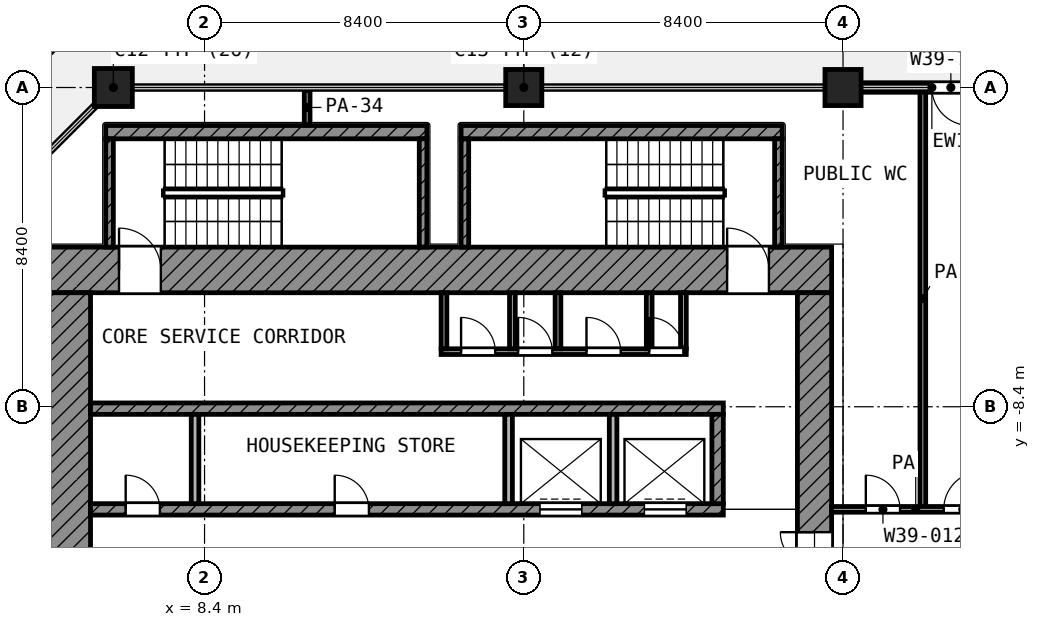
"""IFC4 building model, lengths in metres.
Left out: names, types, materials, properties, quantities, classifications, styles, units other than length and angle.
Written with IfcOpenShell. Run it as: python <this file> out.ifc"""

import sys

from ifc_helpers import new_model, si_unit, direction, frame, frame_2d, origin, origin_2d, place, context, subcontext, project, spatial, rectangle, extrude, element, fill, save


model = new_model("IFC4")
c1 = context("Model", 3, precision=1e-05, world=origin(), true_north=direction((0.0, 1.0)))
c2 = subcontext(c1, "Body", "Model", "MODEL_VIEW")
j1 = project(units=[si_unit("LENGTHUNIT", "METRE"), si_unit("PLANEANGLEUNIT", "RADIAN")], contexts=[c1])
p1 = place(None, origin())
s1 = spatial("IfcSite", under=j1, at=p1, CompositionType="ELEMENT")
p2 = place(p1, origin())
s2 = spatial("IfcBuilding", under=s1, at=p2, CompositionType="ELEMENT")
p3 = place(p2, frame((0.0, 0.0, 192.0)))
s3 = spatial("IfcBuildingStorey", under=s2, at=p3, CompositionType="ELEMENT", Elevation=192.0)
p4 = place(p3, frame((6.0, 0.0, 0.0), z_axis=(0.0, 0.0, 1.0), x_axis=(1.0, 0.0, 0.0)))
e1 = element("IfcColumn", 1, at=p4, inside=s3, PredefinedType="COLUMN", context=c2, shape_type="SweptSolid", body=[
    extrude(rectangle(XDim=1.0, YDim=1.0, at=origin_2d()), origin(), (0.0, 0.0, 1.0), 4.2),
])
for number, where, z_axis, x_axis in (
    (2, (16.8, 0.0, 0.0), (0.0, 0.0, 1.0), (1.0, 0.0, 0.0)),
    (3, (25.2, 0.0, 0.0), (0.0, 0.0, 1.0), (1.0, 0.0, 0.0)),
):
    element("IfcColumn", number, at=place(p3, frame(where, z_axis=z_axis, x_axis=x_axis)), inside=s3, PredefinedType="COLUMN", context=c2, shape_type="SweptSolid", body=[
        extrude(rectangle(XDim=0.95, YDim=0.95, at=origin_2d()), origin(), (0.0, 0.0, 1.0), 4.2),
    ])
p5 = place(p3, frame((29.4, 0.0, 0.0), z_axis=(0.0, 0.0, 1.0), x_axis=(-1.0, 0.0, 0.0)))
e4 = element("IfcWall", 4, at=p5, inside=s3, PredefinedType="SOLIDWALL", context=c2, shape_type="SweptSolid", body=[
    extrude(rectangle(XDim=3.725, YDim=0.25, at=frame_2d((1.862, 0.0))), origin(), (0.0, 0.0, 1.0), 2.58),
])
p6 = place(p5, frame((0.863, 0.0, 0.0)))
e5 = element("IfcOpeningElement", 5, at=p6, cuts=e4, PredefinedType="OPENING", context=c2, shape_type="SweptSolid", body=[
    extrude(rectangle(XDim=1.0, YDim=2.1, at=frame_2d((0.5, 1.05))), frame((0.0, 0.135, 0.0), z_axis=(0.0, -1.0, 0.0), x_axis=(1.0, 0.0, 0.0)), (0.0, 0.0, 1.0), 0.27),
])
p7 = place(p3, frame((4.2, -4.8, 0.0), z_axis=(0.0, 0.0, 1.0), x_axis=(1.0, 0.0, 0.0)))
e6 = element("IfcWall", 6, at=p7, inside=s3, PredefinedType="SHEAR", context=c2, shape_type="SweptSolid", body=[
    extrude(rectangle(XDim=20.7, YDim=1.2, at=frame_2d((10.35, 0.0))), origin(), (0.0, 0.0, 1.0), 3.6),
])
p8 = place(p7, frame((1.95, 0.0, 0.0)))
e7 = element("IfcOpeningElement", 7, at=p8, cuts=e6, PredefinedType="OPENING", context=c2, shape_type="SweptSolid", body=[
    extrude(rectangle(XDim=1.1, YDim=2.1, at=frame_2d((0.55, 1.05))), frame((0.0, 0.61, 0.0), z_axis=(0.0, -1.0, 0.0), x_axis=(1.0, 0.0, 0.0)), (0.0, 0.0, 1.0), 1.22),
])
p9 = place(p7, frame((17.95, 0.0, 0.0)))
e8 = element("IfcOpeningElement", 8, at=p9, cuts=e6, PredefinedType="OPENING", context=c2, shape_type="SweptSolid", body=[
    extrude(rectangle(XDim=1.1, YDim=2.1, at=frame_2d((0.55, 1.05))), frame((0.0, 0.61, 0.0), z_axis=(0.0, -1.0, 0.0), x_axis=(1.0, 0.0, 0.0)), (0.0, 0.0, 1.0), 1.22),
])
p10 = place(p3, frame((4.8, -24.9, 0.0), z_axis=(0.0, 0.0, 1.0), x_axis=(0.0, 1.0, 0.0)))
e9 = element("IfcWall", 9, at=p10, inside=s3, PredefinedType="SHEAR", context=c2, shape_type="SweptSolid", body=[
    extrude(rectangle(XDim=19.5, YDim=1.2, at=frame_2d((9.75, 0.0))), origin(), (0.0, 0.0, 1.0), 3.6),
])
p11 = place(p10, frame((11.35, 0.0, 0.0)))
e10 = element("IfcOpeningElement", 10, at=p11, cuts=e9, PredefinedType="OPENING", context=c2, shape_type="SweptSolid", body=[
    extrude(rectangle(XDim=1.1, YDim=2.1, at=frame_2d((0.55, 1.05))), frame((0.0, 0.61, 0.0), z_axis=(0.0, -1.0, 0.0), x_axis=(1.0, 0.0, 0.0)), (0.0, 0.0, 1.0), 1.22),
])
p12 = place(p10, frame((2.05, 0.0, 0.0)))
e11 = element("IfcOpeningElement", 11, at=p12, cuts=e9, PredefinedType="OPENING", context=c2, shape_type="SweptSolid", body=[
    extrude(rectangle(XDim=1.1, YDim=2.1, at=frame_2d((0.55, 1.05))), frame((0.0, 0.61, 0.0), z_axis=(0.0, -1.0, 0.0), x_axis=(1.0, 0.0, 0.0)), (0.0, 0.0, 1.0), 1.22),
])
p13 = place(p3, frame((24.45, -24.0, 0.0), z_axis=(0.0, 0.0, 1.0), x_axis=(0.0, 1.0, 0.0)))
e12 = element("IfcWall", 12, at=p13, inside=s3, PredefinedType="SHEAR", context=c2, shape_type="SweptSolid", body=[
    extrude(rectangle(XDim=18.6, YDim=0.9, at=frame_2d((9.3, 0.0))), origin(), (0.0, 0.0, 1.0), 3.6),
])
p14 = place(p13, frame((10.5, 0.0, 0.0)))
e13 = element("IfcOpeningElement", 13, at=p14, cuts=e12, PredefinedType="OPENING", context=c2, shape_type="SweptSolid", body=[
    extrude(rectangle(XDim=1.8, YDim=2.1, at=frame_2d((0.9, 1.05))), frame((0.0, 0.46, 0.0), z_axis=(0.0, -1.0, 0.0), x_axis=(1.0, 0.0, 0.0)), (0.0, 0.0, 1.0), 0.92),
])
p15 = place(p3, frame((5.4, -8.45, 0.0), z_axis=(0.0, 0.0, 1.0), x_axis=(1.0, 0.0, 0.0)))
e14 = element("IfcWall", 14, at=p15, inside=s3, PredefinedType="SHEAR", context=c2, shape_type="SweptSolid", body=[
    extrude(rectangle(XDim=16.65, YDim=0.3, at=frame_2d((8.325, 0.0))), origin(), (0.0, 0.0, 1.0), 3.6),
])
p16 = place(p3, frame((5.4, -11.1, 0.0), z_axis=(0.0, 0.0, 1.0), x_axis=(1.0, 0.0, 0.0)))
e15 = element("IfcWall", 15, at=p16, inside=s3, PredefinedType="SHEAR", context=c2, shape_type="SweptSolid", body=[
    extrude(rectangle(XDim=16.65, YDim=0.3, at=frame_2d((8.325, 0.0))), origin(), (0.0, 0.0, 1.0), 3.6),
])
p17 = place(p16, frame((11.825, 0.0, 0.0)))
e16 = element("IfcOpeningElement", 16, at=p17, cuts=e15, PredefinedType="OPENING", context=c2, shape_type="SweptSolid", body=[
    extrude(rectangle(XDim=1.1, YDim=2.1, at=frame_2d((0.55, 1.05))), frame((0.0, 0.16, 0.0), z_axis=(0.0, -1.0, 0.0), x_axis=(1.0, 0.0, 0.0)), (0.0, 0.0, 1.0), 0.32),
])
p18 = place(p16, frame((14.575, 0.0, 0.0)))
e17 = element("IfcOpeningElement", 17, at=p18, cuts=e15, PredefinedType="OPENING", context=c2, shape_type="SweptSolid", body=[
    extrude(rectangle(XDim=1.1, YDim=2.1, at=frame_2d((0.55, 1.05))), frame((0.0, 0.16, 0.0), z_axis=(0.0, -1.0, 0.0), x_axis=(1.0, 0.0, 0.0)), (0.0, 0.0, 1.0), 0.32),
])
p19 = place(p16, frame((0.925, 0.0, 0.0)))
e18 = element("IfcOpeningElement", 18, at=p19, cuts=e15, PredefinedType="OPENING", context=c2, shape_type="SweptSolid", body=[
    extrude(rectangle(XDim=0.9, YDim=2.1, at=frame_2d((0.45, 1.05))), frame((0.0, 0.16, 0.0), z_axis=(0.0, -1.0, 0.0), x_axis=(1.0, 0.0, 0.0)), (0.0, 0.0, 1.0), 0.32),
])
p20 = place(p16, frame((6.425, 0.0, 0.0)))
e19 = element("IfcOpeningElement", 19, at=p20, cuts=e15, PredefinedType="OPENING", context=c2, shape_type="SweptSolid", body=[
    extrude(rectangle(XDim=0.9, YDim=2.1, at=frame_2d((0.45, 1.05))), frame((0.0, 0.16, 0.0), z_axis=(0.0, -1.0, 0.0), x_axis=(1.0, 0.0, 0.0)), (0.0, 0.0, 1.0), 0.32),
])
p21 = place(p3, frame((21.9, -10.95, 0.0), z_axis=(0.0, 0.0, 1.0), x_axis=(0.0, 1.0, 0.0)))
e20 = element("IfcWall", 20, at=p21, inside=s3, PredefinedType="SHEAR", context=c2, shape_type="SweptSolid", body=[
    extrude(rectangle(XDim=2.35, YDim=0.3, at=frame_2d((1.175, 0.0))), origin(), (0.0, 0.0, 1.0), 3.6),
])
for number, where, z_axis, x_axis in (
    (21, (8.15, -10.95, 0.0), (0.0, 0.0, 1.0), (0.0, 1.0, 0.0)),
    (22, (16.4, -10.95, 0.0), (0.0, 0.0, 1.0), (0.0, 1.0, 0.0)),
    (23, (19.15, -10.95, 0.0), (0.0, 0.0, 1.0), (0.0, 1.0, 0.0)),
):
    element("IfcWall", number, at=place(p3, frame(where, z_axis=z_axis, x_axis=x_axis)), inside=s3, PredefinedType="PARTITIONING", context=c2, shape_type="SweptSolid", body=[
        extrude(rectangle(XDim=2.35, YDim=0.2, at=frame_2d((1.175, 0.0))), origin(), (0.0, 0.0, 1.0), 3.6),
    ])
p22 = place(p3, frame((14.625, -6.95, 0.0), z_axis=(0.0, 0.0, 1.0), x_axis=(1.0, 0.0, 0.0)))
e24 = element("IfcWall", 24, at=p22, inside=s3, PredefinedType="PARTITIONING", context=c2, shape_type="SweptSolid", body=[
    extrude(rectangle(XDim=6.45, YDim=0.15, at=frame_2d((3.225, 0.0))), origin(), (0.0, 0.0, 1.0), 3.6),
])
p23 = place(p22, frame((0.525, 0.0, 0.0)))
e25 = element("IfcOpeningElement", 25, at=p23, cuts=e24, PredefinedType="OPENING", context=c2, shape_type="SweptSolid", body=[
    extrude(rectangle(XDim=0.9, YDim=2.1, at=frame_2d((0.45, 1.05))), frame((0.0, 0.085, 0.0), z_axis=(0.0, -1.0, 0.0), x_axis=(1.0, 0.0, 0.0)), (0.0, 0.0, 1.0), 0.17),
])
p24 = place(p22, frame((2.025, 0.0, 0.0)))
e26 = element("IfcOpeningElement", 26, at=p24, cuts=e24, PredefinedType="OPENING", context=c2, shape_type="SweptSolid", body=[
    extrude(rectangle(XDim=0.9, YDim=2.1, at=frame_2d((0.45, 1.05))), frame((0.0, 0.085, 0.0), z_axis=(0.0, -1.0, 0.0), x_axis=(1.0, 0.0, 0.0)), (0.0, 0.0, 1.0), 0.17),
])
p25 = place(p22, frame((3.825, 0.0, 0.0)))
e27 = element("IfcOpeningElement", 27, at=p25, cuts=e24, PredefinedType="OPENING", context=c2, shape_type="SweptSolid", body=[
    extrude(rectangle(XDim=0.9, YDim=2.1, at=frame_2d((0.45, 1.05))), frame((0.0, 0.085, 0.0), z_axis=(0.0, -1.0, 0.0), x_axis=(1.0, 0.0, 0.0)), (0.0, 0.0, 1.0), 0.17),
])
p26 = place(p22, frame((5.475, 0.0, 0.0)))
e28 = element("IfcOpeningElement", 28, at=p26, cuts=e24, PredefinedType="OPENING", context=c2, shape_type="SweptSolid", body=[
    extrude(rectangle(XDim=0.9, YDim=2.1, at=frame_2d((0.45, 1.05))), frame((0.0, 0.085, 0.0), z_axis=(0.0, -1.0, 0.0), x_axis=(1.0, 0.0, 0.0)), (0.0, 0.0, 1.0), 0.17),
])
for number, where, z_axis, x_axis in (
    (29, (14.7, -6.875, 0.0), (0.0, 0.0, 1.0), (0.0, 1.0, 0.0)),
    (30, (16.5, -6.875, 0.0), (0.0, 0.0, 1.0), (0.0, 1.0, 0.0)),
    (31, (17.7, -6.875, 0.0), (0.0, 0.0, 1.0), (0.0, 1.0, 0.0)),
    (32, (20.1, -6.875, 0.0), (0.0, 0.0, 1.0), (0.0, 1.0, 0.0)),
    (33, (21.0, -6.875, 0.0), (0.0, 0.0, 1.0), (0.0, 1.0, 0.0)),
):
    element("IfcWall", number, at=place(p3, frame(where, z_axis=z_axis, x_axis=x_axis)), inside=s3, PredefinedType="PARTITIONING", context=c2, shape_type="SweptSolid", body=[
        extrude(rectangle(XDim=1.475, YDim=0.15, at=frame_2d((0.738, 0.0))), origin(), (0.0, 0.0, 1.0), 3.6),
    ])
p27 = place(p3, frame((5.8, -1.175, 0.0), z_axis=(0.0, 0.0, 1.0), x_axis=(1.0, 0.0, 0.0)))
e34 = element("IfcWall", 34, at=p27, inside=s3, PredefinedType="SHEAR", context=c2, shape_type="SweptSolid", body=[
    extrude(rectangle(XDim=8.45, YDim=0.35, at=frame_2d((4.225, 0.0))), origin(), (0.0, 0.0, 1.0), 3.6),
])
for number, where, z_axis, x_axis in (
    (35, (5.9, -4.2, 0.0), (0.0, 0.0, 1.0), (0.0, 1.0, 0.0)),
    (36, (14.15, -4.2, 0.0), (0.0, 0.0, 1.0), (0.0, 1.0, 0.0)),
):
    element("IfcWall", number, at=place(p3, frame(where, z_axis=z_axis, x_axis=x_axis)), inside=s3, PredefinedType="SHEAR", context=c2, shape_type="SweptSolid", body=[
        extrude(rectangle(XDim=2.85, YDim=0.2, at=frame_2d((1.425, 0.0))), origin(), (0.0, 0.0, 1.0), 3.6),
    ])
p28 = place(p3, frame((15.15, -1.175, 0.0), z_axis=(0.0, 0.0, 1.0), x_axis=(1.0, 0.0, 0.0)))
e37 = element("IfcWall", 37, at=p28, inside=s3, PredefinedType="SHEAR", context=c2, shape_type="SweptSolid", body=[
    extrude(rectangle(XDim=8.45, YDim=0.35, at=frame_2d((4.225, 0.0))), origin(), (0.0, 0.0, 1.0), 3.6),
])
for number, where, z_axis, x_axis in (
    (38, (15.25, -4.2, 0.0), (0.0, 0.0, 1.0), (0.0, 1.0, 0.0)),
    (39, (23.5, -4.2, 0.0), (0.0, 0.0, 1.0), (0.0, 1.0, 0.0)),
):
    element("IfcWall", number, at=place(p3, frame(where, z_axis=z_axis, x_axis=x_axis)), inside=s3, PredefinedType="SHEAR", context=c2, shape_type="SweptSolid", body=[
        extrude(rectangle(XDim=2.85, YDim=0.2, at=frame_2d((1.425, 0.0))), origin(), (0.0, 0.0, 1.0), 3.6),
    ])
p29 = place(p3, frame((24.9, -11.1, 0.0), z_axis=(0.0, 0.0, 1.0), x_axis=(1.0, 0.0, 0.0)))
e40 = element("IfcWall", 40, at=p29, inside=s3, PredefinedType="PARTITIONING", context=c2, shape_type="SweptSolid", body=[
    extrude(rectangle(XDim=4.425, YDim=0.15, at=frame_2d((2.212, 0.0))), origin(), (0.0, 0.0, 1.0), 3.6),
])
p30 = place(p29, frame((0.9, 0.0, 0.0)))
e41 = element("IfcOpeningElement", 41, at=p30, cuts=e40, PredefinedType="OPENING", context=c2, shape_type="SweptSolid", body=[
    extrude(rectangle(XDim=0.9, YDim=2.1, at=frame_2d((0.45, 1.05))), frame((0.0, 0.085, 0.0), z_axis=(0.0, -1.0, 0.0), x_axis=(1.0, 0.0, 0.0)), (0.0, 0.0, 1.0), 0.17),
])
p31 = place(p29, frame((2.95, 0.0, 0.0)))
e42 = element("IfcOpeningElement", 42, at=p31, cuts=e40, PredefinedType="OPENING", context=c2, shape_type="SweptSolid", body=[
    extrude(rectangle(XDim=1.0, YDim=2.1, at=frame_2d((0.5, 1.05))), frame((0.0, 0.085, 0.0), z_axis=(0.0, -1.0, 0.0), x_axis=(1.0, 0.0, 0.0)), (0.0, 0.0, 1.0), 0.17),
])
p32 = place(p3, frame((11.1, -0.97, 0.0), z_axis=(0.0, 0.0, 1.0), x_axis=(0.0, 1.0, 0.0)))
e43 = element("IfcWall", 43, at=p32, inside=s3, PredefinedType="PARTITIONING", context=c2, shape_type="SweptSolid", body=[
    extrude(rectangle(XDim=0.89, YDim=0.15, at=frame_2d((0.445, 0.0))), origin(), (0.0, 0.0, 1.0), 2.7),
])
p33 = place(p3, frame((27.3, -11.025, 0.0), z_axis=(0.0, 0.0, 1.0), x_axis=(0.0, 1.0, 0.0)))
e44 = element("IfcWall", 44, at=p33, inside=s3, PredefinedType="PARTITIONING", context=c2, shape_type="SweptSolid", body=[
    extrude(rectangle(XDim=10.945, YDim=0.15, at=frame_2d((5.472, 0.0))), origin(), (0.0, 0.0, 1.0), 2.7),
])
p34 = place(p6, origin())
e45 = element("IfcDoor", 45, at=p34, inside=s3, OperationType="SINGLE_SWING_LEFT", PredefinedType="DOOR", context=c2, shape_type="SweptSolid", body=[
    extrude(rectangle(XDim=1.0, YDim=2.1, at=frame_2d((0.5, 1.05))), frame((0.0, 0.025, 0.0), z_axis=(0.0, -1.0, 0.0), x_axis=(1.0, 0.0, 0.0)), (0.0, 0.0, 1.0), 0.05),
])
fill(e5, e45)
p35 = place(p17, origin())
e46 = element("IfcDoor", 46, at=p35, inside=s3, OperationType="DOUBLE_DOOR_SLIDING", PredefinedType="DOOR", context=c2, shape_type="SweptSolid", body=[
    extrude(rectangle(XDim=1.1, YDim=2.1, at=frame_2d((0.55, 1.05))), frame((0.0, 0.025, 0.0), z_axis=(0.0, -1.0, 0.0), x_axis=(1.0, 0.0, 0.0)), (0.0, 0.0, 1.0), 0.05),
])
fill(e16, e46)
p36 = place(p18, origin())
e47 = element("IfcDoor", 47, at=p36, inside=s3, OperationType="DOUBLE_DOOR_SLIDING", PredefinedType="DOOR", context=c2, shape_type="SweptSolid", body=[
    extrude(rectangle(XDim=1.1, YDim=2.1, at=frame_2d((0.55, 1.05))), frame((0.0, 0.025, 0.0), z_axis=(0.0, -1.0, 0.0), x_axis=(1.0, 0.0, 0.0)), (0.0, 0.0, 1.0), 0.05),
])
fill(e17, e47)
p37 = place(p8, origin())
e48 = element("IfcDoor", 48, at=p37, inside=s3, OperationType="SINGLE_SWING_LEFT", PredefinedType="DOOR", context=c2, shape_type="SweptSolid", body=[
    extrude(rectangle(XDim=1.1, YDim=2.1, at=frame_2d((0.55, 1.05))), frame((0.0, 0.025, 0.0), z_axis=(0.0, -1.0, 0.0), x_axis=(1.0, 0.0, 0.0)), (0.0, 0.0, 1.0), 0.05),
])
fill(e7, e48)
p38 = place(p9, origin())
e49 = element("IfcDoor", 49, at=p38, inside=s3, OperationType="SINGLE_SWING_LEFT", PredefinedType="DOOR", context=c2, shape_type="SweptSolid", body=[
    extrude(rectangle(XDim=1.1, YDim=2.1, at=frame_2d((0.55, 1.05))), frame((0.0, 0.025, 0.0), z_axis=(0.0, -1.0, 0.0), x_axis=(1.0, 0.0, 0.0)), (0.0, 0.0, 1.0), 0.05),
])
fill(e8, e49)
p39 = place(p14, origin())
e50 = element("IfcDoor", 50, at=p39, inside=s3, OperationType="DOUBLE_DOOR_SINGLE_SWING", PredefinedType="DOOR", context=c2, shape_type="SweptSolid", body=[
    extrude(rectangle(XDim=1.8, YDim=2.1, at=frame_2d((0.9, 1.05))), frame((0.0, 0.025, 0.0), z_axis=(0.0, -1.0, 0.0), x_axis=(1.0, 0.0, 0.0)), (0.0, 0.0, 1.0), 0.05),
])
fill(e13, e50)
p40 = place(p23, origin())
e51 = element("IfcDoor", 51, at=p40, inside=s3, OperationType="SINGLE_SWING_LEFT", PredefinedType="DOOR", context=c2, shape_type="SweptSolid", body=[
    extrude(rectangle(XDim=0.9, YDim=2.1, at=frame_2d((0.45, 1.05))), frame((0.0, 0.025, 0.0), z_axis=(0.0, -1.0, 0.0), x_axis=(1.0, 0.0, 0.0)), (0.0, 0.0, 1.0), 0.05),
])
fill(e25, e51)
p41 = place(p24, origin())
e52 = element("IfcDoor", 52, at=p41, inside=s3, OperationType="SINGLE_SWING_LEFT", PredefinedType="DOOR", context=c2, shape_type="SweptSolid", body=[
    extrude(rectangle(XDim=0.9, YDim=2.1, at=frame_2d((0.45, 1.05))), frame((0.0, 0.025, 0.0), z_axis=(0.0, -1.0, 0.0), x_axis=(1.0, 0.0, 0.0)), (0.0, 0.0, 1.0), 0.05),
])
fill(e26, e52)
p42 = place(p25, origin())
e53 = element("IfcDoor", 53, at=p42, inside=s3, OperationType="SINGLE_SWING_LEFT", PredefinedType="DOOR", context=c2, shape_type="SweptSolid", body=[
    extrude(rectangle(XDim=0.9, YDim=2.1, at=frame_2d((0.45, 1.05))), frame((0.0, 0.025, 0.0), z_axis=(0.0, -1.0, 0.0), x_axis=(1.0, 0.0, 0.0)), (0.0, 0.0, 1.0), 0.05),
])
fill(e27, e53)
p43 = place(p26, origin())
e54 = element("IfcDoor", 54, at=p43, inside=s3, OperationType="SINGLE_SWING_LEFT", PredefinedType="DOOR", context=c2, shape_type="SweptSolid", body=[
    extrude(rectangle(XDim=0.9, YDim=2.1, at=frame_2d((0.45, 1.05))), frame((0.0, 0.025, 0.0), z_axis=(0.0, -1.0, 0.0), x_axis=(1.0, 0.0, 0.0)), (0.0, 0.0, 1.0), 0.05),
])
fill(e28, e54)
p44 = place(p19, origin())
e55 = element("IfcDoor", 55, at=p44, inside=s3, OperationType="SINGLE_SWING_LEFT", PredefinedType="DOOR", context=c2, shape_type="SweptSolid", body=[
    extrude(rectangle(XDim=0.9, YDim=2.1, at=frame_2d((0.45, 1.05))), frame((0.0, 0.025, 0.0), z_axis=(0.0, -1.0, 0.0), x_axis=(1.0, 0.0, 0.0)), (0.0, 0.0, 1.0), 0.05),
])
fill(e18, e55)
p45 = place(p20, origin())
e56 = element("IfcDoor", 56, at=p45, inside=s3, OperationType="SINGLE_SWING_LEFT", PredefinedType="DOOR", context=c2, shape_type="SweptSolid", body=[
    extrude(rectangle(XDim=0.9, YDim=2.1, at=frame_2d((0.45, 1.05))), frame((0.0, 0.025, 0.0), z_axis=(0.0, -1.0, 0.0), x_axis=(1.0, 0.0, 0.0)), (0.0, 0.0, 1.0), 0.05),
])
fill(e19, e56)
p46 = place(p30, origin())
e57 = element("IfcDoor", 57, at=p46, inside=s3, OperationType="SINGLE_SWING_LEFT", PredefinedType="DOOR", context=c2, shape_type="SweptSolid", body=[
    extrude(rectangle(XDim=0.9, YDim=2.1, at=frame_2d((0.45, 1.05))), frame((0.0, 0.025, 0.0), z_axis=(0.0, -1.0, 0.0), x_axis=(1.0, 0.0, 0.0)), (0.0, 0.0, 1.0), 0.05),
])
fill(e41, e57)
p47 = place(p31, origin())
e58 = element("IfcDoor", 58, at=p47, inside=s3, OperationType="SINGLE_SWING_RIGHT", PredefinedType="DOOR", context=c2, shape_type="SweptSolid", body=[
    extrude(rectangle(XDim=1.0, YDim=2.1, at=frame_2d((0.5, 1.05))), frame((0.0, 0.025, 0.0), z_axis=(0.0, -1.0, 0.0), x_axis=(1.0, 0.0, 0.0)), (0.0, 0.0, 1.0), 0.05),
])
fill(e42, e58)
save(model, sys.argv[1])
